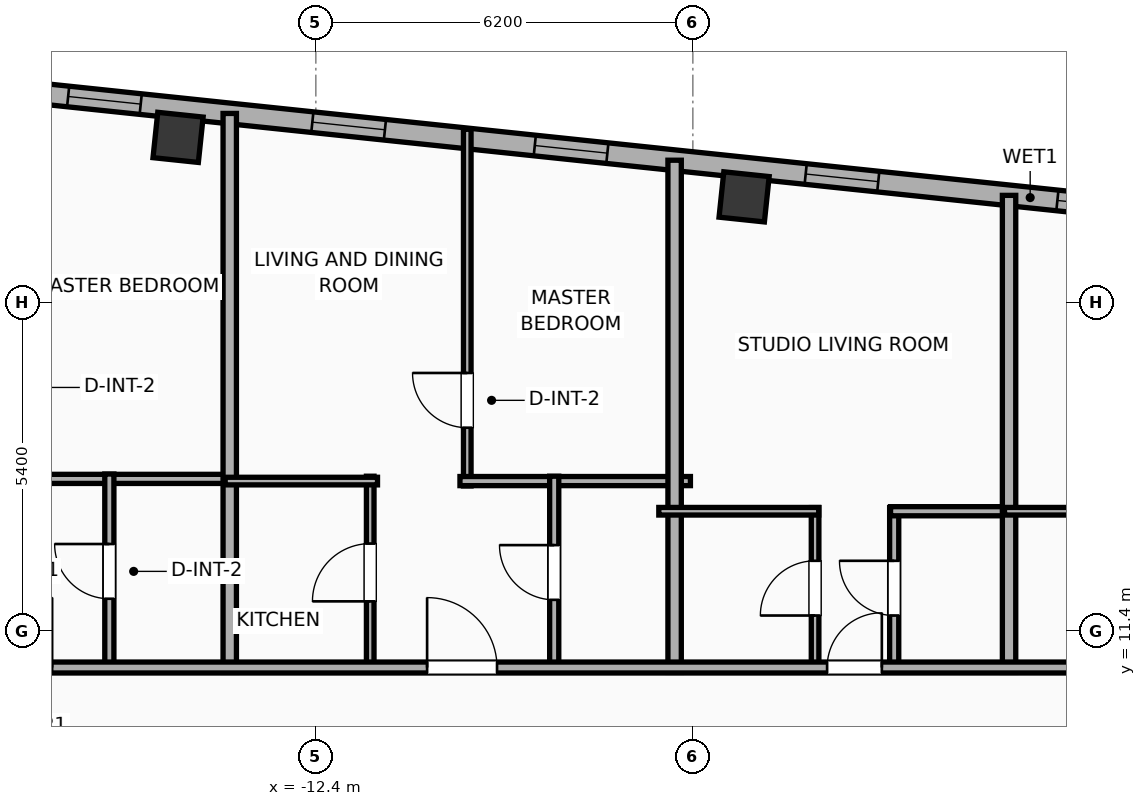
"""IFC4 building model, lengths in metres.
Left out: names, types, materials, properties, quantities, classifications, styles, units other than length and angle.
Written with IfcOpenShell. Run it as: python <this file> out.ifc"""

import sys

from ifc_helpers import new_model, si_unit, direction, frame, frame_2d, origin, origin_2d, place, context, subcontext, project, spatial, rectangle, hollow_rectangle, extrude, element, fill, save


model = new_model("IFC4")
c1 = context("Model", 3, precision=1e-05, world=origin(), true_north=direction((0.0, 1.0)))
c2 = subcontext(c1, "Body", "Model", "MODEL_VIEW")
j1 = project(units=[si_unit("LENGTHUNIT", "METRE"), si_unit("PLANEANGLEUNIT", "RADIAN")], contexts=[c1])
p1 = place(None, origin())
s1 = spatial("IfcSite", under=j1, at=p1, CompositionType="ELEMENT")
p2 = place(p1, origin())
s2 = spatial("IfcBuilding", under=s1, at=p2, CompositionType="ELEMENT")
p3 = place(p2, frame((0.0, 0.0, 279.5)))
s3 = spatial("IfcBuildingStorey", under=s2, at=p3, CompositionType="ELEMENT", Elevation=279.5)
for number, where, z_axis, x_axis in (
    (1, (-5.357, 18.54, 0.0), (0.0, 0.0, 1.0), (0.995, -0.105, 0.0)),
    (2, (-14.666, 19.518, 0.0), (0.0, 0.0, 1.0), (0.995, -0.105, 0.0)),
):
    element("IfcColumn", number, at=place(p3, frame(where, z_axis=z_axis, x_axis=x_axis)), inside=s3, PredefinedType="COLUMN", context=c2, shape_type="SweptSolid", body=[
        extrude(hollow_rectangle(XDim=0.75, YDim=0.75, WallThickness=0.025, at=origin_2d()), origin(), (0.0, 0.0, 1.0), 3.9),
    ])
p4 = place(p3, frame((-23.908, 20.972, 0.0), z_axis=(0.0, 0.0, 1.0), x_axis=(0.994521888554, -0.104528528102, 0.0)))
e3 = element("IfcWall", 3, at=p4, inside=s3, PredefinedType="ELEMENTEDWALL", context=c2, shape_type="SweptSolid", body=[
    extrude(rectangle(XDim=46.766, YDim=0.34, at=frame_2d((23.383, 0.0))), origin(), (0.0, 0.0, 1.0), 3.65),
])
p5 = place(p4, frame((23.833, 0.0, 0.75)))
e4 = element("IfcOpeningElement", 4, at=p5, cuts=e3, PredefinedType="OPENING", context=c2, shape_type="SweptSolid", body=[
    extrude(rectangle(XDim=2.4, YDim=2.1, at=frame_2d((1.2, 1.05))), frame((0.0, 0.18, 0.0), z_axis=(0.0, -1.0, 0.0), x_axis=(1.0, 0.0, 0.0)), (0.0, 0.0, 1.0), 0.36),
])
p6 = place(p4, frame((1.243, 0.0, 0.75)))
e5 = element("IfcOpeningElement", 5, at=p6, cuts=e3, PredefinedType="OPENING", context=c2, shape_type="SweptSolid", body=[
    extrude(rectangle(XDim=1.2, YDim=2.05, at=frame_2d((0.6, 1.025))), frame((0.0, 0.18, 0.0), z_axis=(0.0, -1.0, 0.0), x_axis=(1.0, 0.0, 0.0)), (0.0, 0.0, 1.0), 0.36),
])
p7 = place(p4, frame((4.157, 0.0, 0.75)))
e6 = element("IfcOpeningElement", 6, at=p7, cuts=e3, PredefinedType="OPENING", context=c2, shape_type="SweptSolid", body=[
    extrude(rectangle(XDim=1.2, YDim=2.05, at=frame_2d((0.6, 1.025))), frame((0.0, 0.18, 0.0), z_axis=(0.0, -1.0, 0.0), x_axis=(1.0, 0.0, 0.0)), (0.0, 0.0, 1.0), 0.36),
])
p8 = place(p4, frame((7.475, 0.0, 0.75)))
e7 = element("IfcOpeningElement", 7, at=p8, cuts=e3, PredefinedType="OPENING", context=c2, shape_type="SweptSolid", body=[
    extrude(rectangle(XDim=1.2, YDim=2.05, at=frame_2d((0.6, 1.025))), frame((0.0, 0.18, 0.0), z_axis=(0.0, -1.0, 0.0), x_axis=(1.0, 0.0, 0.0)), (0.0, 0.0, 1.0), 0.36),
])
p9 = place(p4, frame((11.513, 0.0, 0.75)))
e8 = element("IfcOpeningElement", 8, at=p9, cuts=e3, PredefinedType="OPENING", context=c2, shape_type="SweptSolid", body=[
    extrude(rectangle(XDim=1.2, YDim=2.05, at=frame_2d((0.6, 1.025))), frame((0.0, 0.18, 0.0), z_axis=(0.0, -1.0, 0.0), x_axis=(1.0, 0.0, 0.0)), (0.0, 0.0, 1.0), 0.36),
])
p10 = place(p4, frame((15.192, 0.0, 0.75)))
e9 = element("IfcOpeningElement", 9, at=p10, cuts=e3, PredefinedType="OPENING", context=c2, shape_type="SweptSolid", body=[
    extrude(rectangle(XDim=1.2, YDim=2.05, at=frame_2d((0.6, 1.025))), frame((0.0, 0.18, 0.0), z_axis=(0.0, -1.0, 0.0), x_axis=(1.0, 0.0, 0.0)), (0.0, 0.0, 1.0), 0.36),
])
p11 = place(p4, frame((19.671, 0.0, 0.75)))
e10 = element("IfcOpeningElement", 10, at=p11, cuts=e3, PredefinedType="OPENING", context=c2, shape_type="SweptSolid", body=[
    extrude(rectangle(XDim=1.2, YDim=2.05, at=frame_2d((0.6, 1.025))), frame((0.0, 0.18, 0.0), z_axis=(0.0, -1.0, 0.0), x_axis=(1.0, 0.0, 0.0)), (0.0, 0.0, 1.0), 0.36),
])
p12 = place(p4, frame((29.801, 0.0, 0.75)))
e11 = element("IfcOpeningElement", 11, at=p12, cuts=e3, PredefinedType="OPENING", context=c2, shape_type="SweptSolid", body=[
    extrude(rectangle(XDim=1.2, YDim=2.05, at=frame_2d((0.6, 1.025))), frame((0.0, 0.18, 0.0), z_axis=(0.0, -1.0, 0.0), x_axis=(1.0, 0.0, 0.0)), (0.0, 0.0, 1.0), 0.36),
])
p13 = place(p4, frame((33.35, 0.0, 0.75)))
e12 = element("IfcOpeningElement", 12, at=p13, cuts=e3, PredefinedType="OPENING", context=c2, shape_type="SweptSolid", body=[
    extrude(rectangle(XDim=1.2, YDim=2.05, at=frame_2d((0.6, 1.025))), frame((0.0, 0.18, 0.0), z_axis=(0.0, -1.0, 0.0), x_axis=(1.0, 0.0, 0.0)), (0.0, 0.0, 1.0), 0.36),
])
p14 = place(p4, frame((38.034, 0.0, 0.75)))
e13 = element("IfcOpeningElement", 13, at=p14, cuts=e3, PredefinedType="OPENING", context=c2, shape_type="SweptSolid", body=[
    extrude(rectangle(XDim=0.85, YDim=2.05, at=frame_2d((0.425, 1.025))), frame((0.0, 0.18, 0.0), z_axis=(0.0, -1.0, 0.0), x_axis=(1.0, 0.0, 0.0)), (0.0, 0.0, 1.0), 0.36),
])
p15 = place(p4, frame((40.448, 0.0, 0.75)))
e14 = element("IfcOpeningElement", 14, at=p15, cuts=e3, PredefinedType="OPENING", context=c2, shape_type="SweptSolid", body=[
    extrude(rectangle(XDim=1.2, YDim=2.05, at=frame_2d((0.6, 1.025))), frame((0.0, 0.18, 0.0), z_axis=(0.0, -1.0, 0.0), x_axis=(1.0, 0.0, 0.0)), (0.0, 0.0, 1.0), 0.36),
])
p16 = place(p4, frame((43.718, 0.0, 0.75)))
e15 = element("IfcOpeningElement", 15, at=p16, cuts=e3, PredefinedType="OPENING", context=c2, shape_type="SweptSolid", body=[
    extrude(rectangle(XDim=1.2, YDim=2.05, at=frame_2d((0.6, 1.025))), frame((0.0, 0.18, 0.0), z_axis=(0.0, -1.0, 0.0), x_axis=(1.0, 0.0, 0.0)), (0.0, 0.0, 1.0), 0.36),
])
p17 = place(p3, frame((-17.346, 13.902, 0.0), z_axis=(0.0, 0.0, 1.0), x_axis=(1.0, 0.0, 0.0)))
e16 = element("IfcWall", 16, at=p17, inside=s3, PredefinedType="PLUMBINGWALL", context=c2, shape_type="SweptSolid", body=[
    extrude(rectangle(XDim=3.605, YDim=0.15, at=frame_2d((1.802, 0.0))), origin(), (0.0, 0.0, 1.0), 3.65),
])
p18 = place(p3, frame((-15.796, 10.78, 0.0), z_axis=(0.0, 0.0, 1.0), x_axis=(0.0, 1.0, 0.0)))
e17 = element("IfcWall", 17, at=p18, inside=s3, PredefinedType="PLUMBINGWALL", context=c2, shape_type="SweptSolid", body=[
    extrude(rectangle(XDim=3.202, YDim=0.15, at=frame_2d((1.601, 0.0))), origin(), (0.0, 0.0, 1.0), 3.65),
])
p19 = place(p18, frame((1.151, 0.0, 0.0)))
e18 = element("IfcOpeningElement", 18, at=p19, cuts=e17, PredefinedType="OPENING", context=c2, shape_type="SweptSolid", body=[
    extrude(rectangle(XDim=0.9, YDim=2.05, at=frame_2d((0.45, 1.025))), frame((0.0, 0.085, 0.0), z_axis=(0.0, -1.0, 0.0), x_axis=(1.0, 0.0, 0.0)), (0.0, 0.0, 1.0), 0.17),
])
p20 = place(p3, frame((-13.816, 10.72, 0.0), z_axis=(0.0, 0.0, 1.0), x_axis=(0.0, 1.0, 0.0)))
e19 = element("IfcWall", 19, at=p20, inside=s3, PredefinedType="PARTITIONING", context=c2, shape_type="SweptSolid", body=[
    extrude(rectangle(XDim=9.192, YDim=0.22, at=frame_2d((4.596, 0.0))), origin(), (0.0, 0.0, 1.0), 3.65),
])
p21 = place(p3, frame((-9.91, 13.786, 0.0), z_axis=(0.0, 0.0, 1.0), x_axis=(0.0, 1.0, 0.0)))
e20 = element("IfcWall", 20, at=p21, inside=s3, PredefinedType="PARTITIONING", context=c2, shape_type="SweptSolid", body=[
    extrude(rectangle(XDim=5.866, YDim=0.125, at=frame_2d((2.933, 0.0))), origin(), (0.0, 0.0, 1.0), 3.65),
])
p22 = place(p21, frame((0.958, 0.0, 0.0)))
e21 = element("IfcOpeningElement", 21, at=p22, cuts=e20, PredefinedType="OPENING", context=c2, shape_type="SweptSolid", body=[
    extrude(rectangle(XDim=0.9, YDim=2.05, at=frame_2d((0.45, 1.025))), frame((0.0, 0.073, 0.0), z_axis=(0.0, -1.0, 0.0), x_axis=(1.0, 0.0, 0.0)), (0.0, 0.0, 1.0), 0.145),
])
p23 = place(p3, frame((-10.03, 13.866, 0.0), z_axis=(0.0, 0.0, 1.0), x_axis=(1.0, 0.0, 0.0)))
e22 = element("IfcWall", 22, at=p23, inside=s3, PredefinedType="PLUMBINGWALL", context=c2, shape_type="SweptSolid", body=[
    extrude(rectangle(XDim=3.79, YDim=0.15, at=frame_2d((1.895, 0.0))), origin(), (0.0, 0.0, 1.0), 3.65),
])
p24 = place(p3, frame((-11.506, 10.78, 0.0), z_axis=(0.0, 0.0, 1.0), x_axis=(0.0, 1.0, 0.0)))
e23 = element("IfcWall", 23, at=p24, inside=s3, PredefinedType="PARTITIONING", context=c2, shape_type="SweptSolid", body=[
    extrude(rectangle(XDim=3.166, YDim=0.125, at=frame_2d((1.583, 0.0))), origin(), (0.0, 0.0, 1.0), 3.65),
])
p25 = place(p24, frame((1.108, 0.0, 0.0)))
e24 = element("IfcOpeningElement", 24, at=p25, cuts=e23, PredefinedType="OPENING", context=c2, shape_type="SweptSolid", body=[
    extrude(rectangle(XDim=0.95, YDim=2.05, at=frame_2d((0.475, 1.025))), frame((0.0, 0.073, 0.0), z_axis=(0.0, -1.0, 0.0), x_axis=(1.0, 0.0, 0.0)), (0.0, 0.0, 1.0), 0.145),
])
p26 = place(p3, frame((-13.891, 13.866, 0.0), z_axis=(0.0, 0.0, 1.0), x_axis=(1.0, 0.0, 0.0)))
e25 = element("IfcWall", 25, at=p26, inside=s3, PredefinedType="PARTITIONING", context=c2, shape_type="SweptSolid", body=[
    extrude(rectangle(XDim=2.505, YDim=0.125, at=frame_2d((1.252, 0.0))), origin(), (0.0, 0.0, 1.0), 3.65),
])
p27 = place(p3, frame((-8.48, 10.78, 0.0), z_axis=(0.0, 0.0, 1.0), x_axis=(0.0, 1.0, 0.0)))
e26 = element("IfcWall", 26, at=p27, inside=s3, PredefinedType="PLUMBINGWALL", context=c2, shape_type="SweptSolid", body=[
    extrude(rectangle(XDim=3.166, YDim=0.15, at=frame_2d((1.583, 0.0))), origin(), (0.0, 0.0, 1.0), 3.65),
])
p28 = place(p27, frame((1.133, 0.0, 0.0)))
e27 = element("IfcOpeningElement", 27, at=p28, cuts=e26, PredefinedType="OPENING", context=c2, shape_type="SweptSolid", body=[
    extrude(rectangle(XDim=0.9, YDim=2.05, at=frame_2d((0.45, 1.025))), frame((0.0, 0.085, 0.0), z_axis=(0.0, -1.0, 0.0), x_axis=(1.0, 0.0, 0.0)), (0.0, 0.0, 1.0), 0.17),
])
p29 = place(p3, frame((-6.5, 10.72, 0.0), z_axis=(0.0, 0.0, 1.0), x_axis=(0.0, 1.0, 0.0)))
e28 = element("IfcWall", 28, at=p29, inside=s3, PredefinedType="PARTITIONING", context=c2, shape_type="SweptSolid", body=[
    extrude(rectangle(XDim=8.423, YDim=0.22, at=frame_2d((4.211, 0.0))), origin(), (0.0, 0.0, 1.0), 3.65),
])
p30 = place(p3, frame((-4.19, 10.78, 0.0), z_axis=(0.0, 0.0, 1.0), x_axis=(0.0, 1.0, 0.0)))
e29 = element("IfcWall", 29, at=p30, inside=s3, PredefinedType="PARTITIONING", context=c2, shape_type="SweptSolid", body=[
    extrude(rectangle(XDim=2.65, YDim=0.125, at=frame_2d((1.325, 0.0))), origin(), (0.0, 0.0, 1.0), 3.65),
])
p31 = place(p30, frame((0.875, 0.0, 0.0)))
e30 = element("IfcOpeningElement", 30, at=p31, cuts=e29, PredefinedType="OPENING", context=c2, shape_type="SweptSolid", body=[
    extrude(rectangle(XDim=0.9, YDim=2.05, at=frame_2d((0.45, 1.025))), frame((0.0, 0.073, 0.0), z_axis=(0.0, -1.0, 0.0), x_axis=(1.0, 0.0, 0.0)), (0.0, 0.0, 1.0), 0.145),
])
p32 = place(p3, frame((-2.889, 10.78, 0.0), z_axis=(0.0, 0.0, 1.0), x_axis=(0.0, 1.0, 0.0)))
e31 = element("IfcWall", 31, at=p32, inside=s3, PredefinedType="PLUMBINGWALL", context=c2, shape_type="SweptSolid", body=[
    extrude(rectangle(XDim=2.65, YDim=0.15, at=frame_2d((1.325, 0.0))), origin(), (0.0, 0.0, 1.0), 3.65),
])
p33 = place(p32, frame((0.875, 0.0, 0.0)))
e32 = element("IfcOpeningElement", 32, at=p33, cuts=e31, PredefinedType="OPENING", context=c2, shape_type="SweptSolid", body=[
    extrude(rectangle(XDim=0.9, YDim=2.05, at=frame_2d((0.45, 1.025))), frame((0.0, 0.085, 0.0), z_axis=(0.0, -1.0, 0.0), x_axis=(1.0, 0.0, 0.0)), (0.0, 0.0, 1.0), 0.17),
])
p34 = place(p3, frame((-6.76, 13.37, 0.0), z_axis=(0.0, 0.0, 1.0), x_axis=(1.0, 0.0, 0.0)))
e33 = element("IfcWall", 33, at=p34, inside=s3, PredefinedType="PARTITIONING", context=c2, shape_type="SweptSolid", body=[
    extrude(rectangle(XDim=2.63, YDim=0.125, at=frame_2d((1.315, 0.0))), origin(), (0.0, 0.0, 1.0), 3.65),
])
p35 = place(p3, frame((-2.949, 13.37, 0.0), z_axis=(0.0, 0.0, 1.0), x_axis=(1.0, 0.0, 0.0)))
e34 = element("IfcWall", 34, at=p35, inside=s3, PredefinedType="PLUMBINGWALL", context=c2, shape_type="SweptSolid", body=[
    extrude(rectangle(XDim=2.024, YDim=0.15, at=frame_2d((1.012, 0.0))), origin(), (0.0, 0.0, 1.0), 3.65),
])
p36 = place(p3, frame((-1.0, 10.72, 0.0), z_axis=(0.0, 0.0, 1.0), x_axis=(0.0, 1.0, 0.0)))
e35 = element("IfcWall", 35, at=p36, inside=s3, PredefinedType="PARTITIONING", context=c2, shape_type="SweptSolid", body=[
    extrude(rectangle(XDim=7.844, YDim=0.22, at=frame_2d((3.922, 0.0))), origin(), (0.0, 0.0, 1.0), 3.65),
])
p37 = place(p3, frame((-1.075, 13.37, 0.0), z_axis=(0.0, 0.0, 1.0), x_axis=(1.0, 0.0, 0.0)))
e36 = element("IfcWall", 36, at=p37, inside=s3, PredefinedType="PARTITIONING", context=c2, shape_type="SweptSolid", body=[
    extrude(rectangle(XDim=2.445, YDim=0.125, at=frame_2d((1.223, 0.0))), origin(), (0.0, 0.0, 1.0), 3.65),
])
p38 = place(p3, frame((-28.443, 10.8, 0.0), z_axis=(0.0, 0.0, 1.0), x_axis=(1.0, 0.0, 0.0)))
e37 = element("IfcWall", 37, at=p38, inside=s3, PredefinedType="PARTITIONING", context=c2, shape_type="SweptSolid", body=[
    extrude(rectangle(XDim=53.956, YDim=0.18, at=frame_2d((26.978, 0.0))), origin(), (0.0, 0.0, 1.0), 3.65),
])
p39 = place(p38, frame((3.213, 0.0, 0.0)))
e38 = element("IfcOpeningElement", 38, at=p39, cuts=e37, PredefinedType="OPENING", context=c2, shape_type="SweptSolid", body=[
    extrude(rectangle(XDim=1.15, YDim=2.05, at=frame_2d((0.575, 1.025))), frame((0.0, 0.1, 0.0), z_axis=(0.0, -1.0, 0.0), x_axis=(1.0, 0.0, 0.0)), (0.0, 0.0, 1.0), 0.2),
])
p40 = place(p38, frame((10.556, 0.0, 0.0)))
e39 = element("IfcOpeningElement", 39, at=p40, cuts=e37, PredefinedType="OPENING", context=c2, shape_type="SweptSolid", body=[
    extrude(rectangle(XDim=1.15, YDim=2.05, at=frame_2d((0.575, 1.025))), frame((0.0, 0.1, 0.0), z_axis=(0.0, -1.0, 0.0), x_axis=(1.0, 0.0, 0.0)), (0.0, 0.0, 1.0), 0.2),
])
p41 = place(p38, frame((17.872, 0.0, 0.0)))
e40 = element("IfcOpeningElement", 40, at=p41, cuts=e37, PredefinedType="OPENING", context=c2, shape_type="SweptSolid", body=[
    extrude(rectangle(XDim=1.15, YDim=2.05, at=frame_2d((0.575, 1.025))), frame((0.0, 0.1, 0.0), z_axis=(0.0, -1.0, 0.0), x_axis=(1.0, 0.0, 0.0)), (0.0, 0.0, 1.0), 0.2),
])
p42 = place(p38, frame((24.45, 0.0, 0.0)))
e41 = element("IfcOpeningElement", 41, at=p42, cuts=e37, PredefinedType="OPENING", context=c2, shape_type="SweptSolid", body=[
    extrude(rectangle(XDim=0.9, YDim=2.05, at=frame_2d((0.45, 1.025))), frame((0.0, 0.1, 0.0), z_axis=(0.0, -1.0, 0.0), x_axis=(1.0, 0.0, 0.0)), (0.0, 0.0, 1.0), 0.2),
])
p43 = place(p38, frame((29.954, 0.0, 0.0)))
e42 = element("IfcOpeningElement", 42, at=p43, cuts=e37, PredefinedType="OPENING", context=c2, shape_type="SweptSolid", body=[
    extrude(rectangle(XDim=0.9, YDim=2.05, at=frame_2d((0.45, 1.025))), frame((0.0, 0.1, 0.0), z_axis=(0.0, -1.0, 0.0), x_axis=(1.0, 0.0, 0.0)), (0.0, 0.0, 1.0), 0.2),
])
p44 = place(p38, frame((36.186, 0.0, 0.0)))
e43 = element("IfcOpeningElement", 43, at=p44, cuts=e37, PredefinedType="OPENING", context=c2, shape_type="SweptSolid", body=[
    extrude(rectangle(XDim=0.9, YDim=2.05, at=frame_2d((0.45, 1.025))), frame((0.0, 0.1, 0.0), z_axis=(0.0, -1.0, 0.0), x_axis=(1.0, 0.0, 0.0)), (0.0, 0.0, 1.0), 0.2),
])
p45 = place(p38, frame((43.249, 0.0, 0.0)))
e44 = element("IfcOpeningElement", 44, at=p45, cuts=e37, PredefinedType="OPENING", context=c2, shape_type="SweptSolid", body=[
    extrude(rectangle(XDim=0.9, YDim=2.05, at=frame_2d((0.45, 1.025))), frame((0.0, 0.1, 0.0), z_axis=(0.0, -1.0, 0.0), x_axis=(1.0, 0.0, 0.0)), (0.0, 0.0, 1.0), 0.2),
])
p46 = place(p38, frame((50.311, 0.0, 0.0)))
e45 = element("IfcOpeningElement", 45, at=p46, cuts=e37, PredefinedType="OPENING", context=c2, shape_type="SweptSolid", body=[
    extrude(rectangle(XDim=0.9, YDim=2.05, at=frame_2d((0.45, 1.025))), frame((0.0, 0.1, 0.0), z_axis=(0.0, -1.0, 0.0), x_axis=(1.0, 0.0, 0.0)), (0.0, 0.0, 1.0), 0.2),
])
p47 = place(p5, origin())
e46 = element("IfcWindow", 46, at=p47, inside=s3, PartitioningType="SINGLE_PANEL", PredefinedType="WINDOW", context=c2, shape_type="SweptSolid", body=[
    extrude(rectangle(XDim=2.4, YDim=2.1, at=frame_2d((1.2, 1.05))), frame((0.0, 0.03, 0.0), z_axis=(0.0, -1.0, 0.0), x_axis=(1.0, 0.0, 0.0)), (0.0, 0.0, 1.0), 0.06),
])
fill(e4, e46)
p48 = place(p8, origin())
e47 = element("IfcWindow", 47, at=p48, inside=s3, PartitioningType="SINGLE_PANEL", PredefinedType="WINDOW", context=c2, shape_type="SweptSolid", body=[
    extrude(rectangle(XDim=1.2, YDim=2.05, at=frame_2d((0.6, 1.025))), frame((0.0, 0.03, 0.0), z_axis=(0.0, -1.0, 0.0), x_axis=(1.0, 0.0, 0.0)), (0.0, 0.0, 1.0), 0.06),
])
fill(e7, e47)
p49 = place(p9, origin())
e48 = element("IfcWindow", 48, at=p49, inside=s3, PartitioningType="SINGLE_PANEL", PredefinedType="WINDOW", context=c2, shape_type="SweptSolid", body=[
    extrude(rectangle(XDim=1.2, YDim=2.05, at=frame_2d((0.6, 1.025))), frame((0.0, 0.03, 0.0), z_axis=(0.0, -1.0, 0.0), x_axis=(1.0, 0.0, 0.0)), (0.0, 0.0, 1.0), 0.06),
])
fill(e8, e48)
p50 = place(p10, origin())
e49 = element("IfcWindow", 49, at=p50, inside=s3, PartitioningType="SINGLE_PANEL", PredefinedType="WINDOW", context=c2, shape_type="SweptSolid", body=[
    extrude(rectangle(XDim=1.2, YDim=2.05, at=frame_2d((0.6, 1.025))), frame((0.0, 0.03, 0.0), z_axis=(0.0, -1.0, 0.0), x_axis=(1.0, 0.0, 0.0)), (0.0, 0.0, 1.0), 0.06),
])
fill(e9, e49)
p51 = place(p11, origin())
e50 = element("IfcWindow", 50, at=p51, inside=s3, PartitioningType="SINGLE_PANEL", PredefinedType="WINDOW", context=c2, shape_type="SweptSolid", body=[
    extrude(rectangle(XDim=1.2, YDim=2.05, at=frame_2d((0.6, 1.025))), frame((0.0, 0.03, 0.0), z_axis=(0.0, -1.0, 0.0), x_axis=(1.0, 0.0, 0.0)), (0.0, 0.0, 1.0), 0.06),
])
fill(e10, e50)
p52 = place(p19, origin())
e51 = element("IfcDoor", 51, at=p52, inside=s3, OperationType="SINGLE_SWING_RIGHT", PredefinedType="DOOR", context=c2, shape_type="SweptSolid", body=[
    extrude(rectangle(XDim=0.9, YDim=2.05, at=frame_2d((0.45, 1.025))), frame((0.0, 0.025, 0.0), z_axis=(0.0, -1.0, 0.0), x_axis=(1.0, 0.0, 0.0)), (0.0, 0.0, 1.0), 0.05),
])
fill(e18, e51)
p53 = place(p22, origin())
e52 = element("IfcDoor", 52, at=p53, inside=s3, OperationType="SINGLE_SWING_RIGHT", PredefinedType="DOOR", context=c2, shape_type="SweptSolid", body=[
    extrude(rectangle(XDim=0.9, YDim=2.05, at=frame_2d((0.45, 1.025))), frame((0.0, 0.025, 0.0), z_axis=(0.0, -1.0, 0.0), x_axis=(1.0, 0.0, 0.0)), (0.0, 0.0, 1.0), 0.05),
])
fill(e21, e52)
p54 = place(p25, origin())
e53 = element("IfcDoor", 53, at=p54, inside=s3, OperationType="SINGLE_SWING_LEFT", PredefinedType="DOOR", context=c2, shape_type="SweptSolid", body=[
    extrude(rectangle(XDim=0.95, YDim=2.05, at=frame_2d((0.475, 1.025))), frame((0.0, 0.025, 0.0), z_axis=(0.0, -1.0, 0.0), x_axis=(1.0, 0.0, 0.0)), (0.0, 0.0, 1.0), 0.05),
])
fill(e24, e53)
p55 = place(p28, origin())
e54 = element("IfcDoor", 54, at=p55, inside=s3, OperationType="SINGLE_SWING_RIGHT", PredefinedType="DOOR", context=c2, shape_type="SweptSolid", body=[
    extrude(rectangle(XDim=0.9, YDim=2.05, at=frame_2d((0.45, 1.025))), frame((0.0, 0.025, 0.0), z_axis=(0.0, -1.0, 0.0), x_axis=(1.0, 0.0, 0.0)), (0.0, 0.0, 1.0), 0.05),
])
fill(e27, e54)
p56 = place(p31, origin())
e55 = element("IfcDoor", 55, at=p56, inside=s3, OperationType="SINGLE_SWING_LEFT", PredefinedType="DOOR", context=c2, shape_type="SweptSolid", body=[
    extrude(rectangle(XDim=0.9, YDim=2.05, at=frame_2d((0.45, 1.025))), frame((0.0, 0.025, 0.0), z_axis=(0.0, -1.0, 0.0), x_axis=(1.0, 0.0, 0.0)), (0.0, 0.0, 1.0), 0.05),
])
fill(e30, e55)
p57 = place(p33, origin())
e56 = element("IfcDoor", 56, at=p57, inside=s3, OperationType="SINGLE_SWING_RIGHT", PredefinedType="DOOR", context=c2, shape_type="SweptSolid", body=[
    extrude(rectangle(XDim=0.9, YDim=2.05, at=frame_2d((0.45, 1.025))), frame((0.0, 0.025, 0.0), z_axis=(0.0, -1.0, 0.0), x_axis=(1.0, 0.0, 0.0)), (0.0, 0.0, 1.0), 0.05),
])
fill(e32, e56)
p58 = place(p41, origin())
e57 = element("IfcDoor", 57, at=p58, inside=s3, OperationType="SINGLE_SWING_LEFT", PredefinedType="DOOR", context=c2, shape_type="SweptSolid", body=[
    extrude(rectangle(XDim=1.15, YDim=2.05, at=frame_2d((0.575, 1.025))), frame((0.0, 0.025, 0.0), z_axis=(0.0, -1.0, 0.0), x_axis=(1.0, 0.0, 0.0)), (0.0, 0.0, 1.0), 0.05),
])
fill(e40, e57)
p59 = place(p42, origin())
e58 = element("IfcDoor", 58, at=p59, inside=s3, OperationType="SINGLE_SWING_RIGHT", PredefinedType="DOOR", context=c2, shape_type="SweptSolid", body=[
    extrude(rectangle(XDim=0.9, YDim=2.05, at=frame_2d((0.45, 1.025))), frame((0.0, 0.025, 0.0), z_axis=(0.0, -1.0, 0.0), x_axis=(1.0, 0.0, 0.0)), (0.0, 0.0, 1.0), 0.05),
])
fill(e41, e58)
save(model, sys.argv[1])
